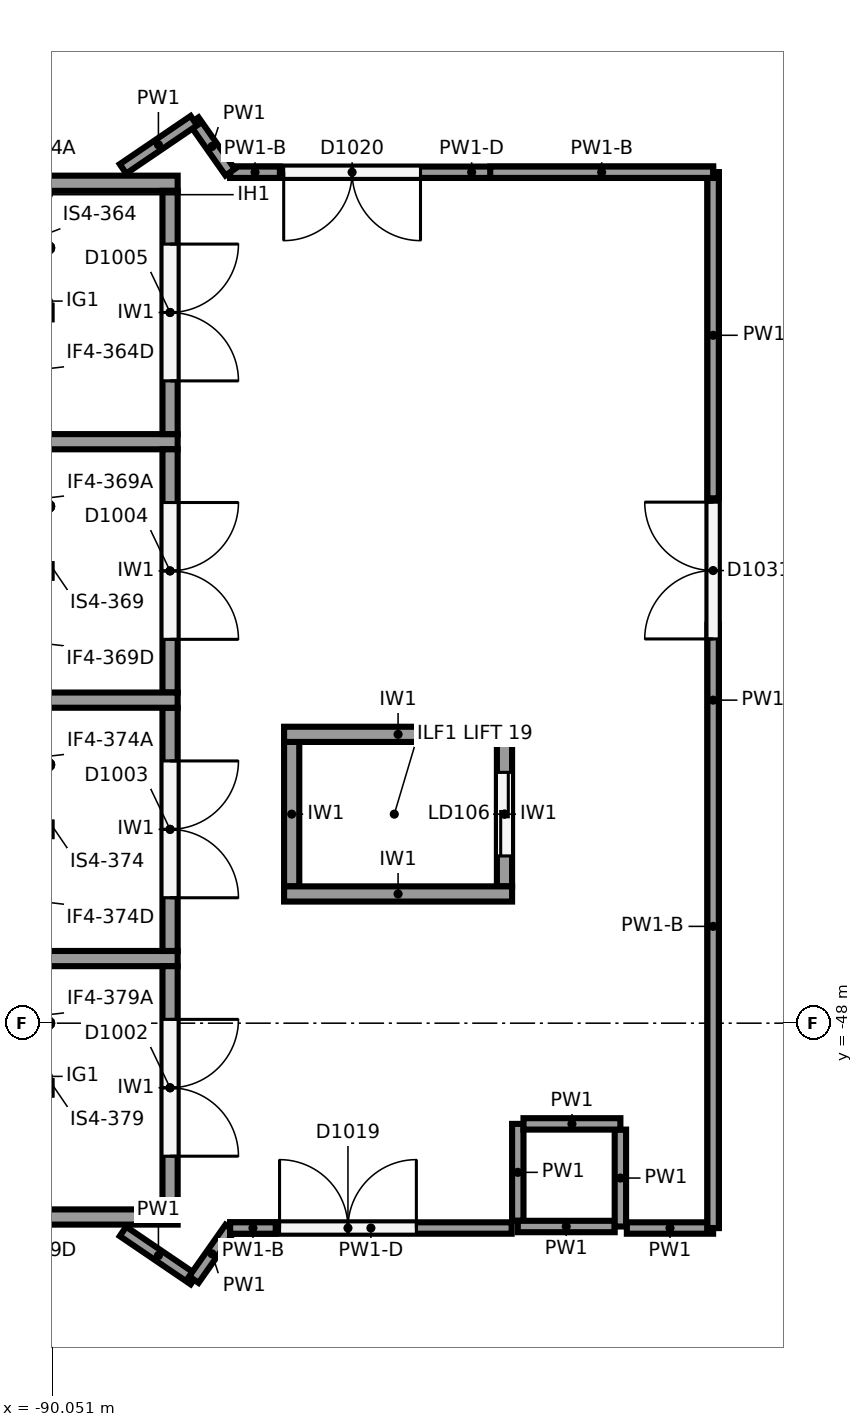
"""IFC4 building model, lengths in metres.
Left out: names, types, materials, properties, quantities, classifications, styles, units other than length and angle.
Written with IfcOpenShell. Run it as: python <this file> out.ifc"""

import sys

from ifc_helpers import new_model, si_unit, direction, frame, frame_2d, origin, origin_2d, place, context, subcontext, project, spatial, rectangle, circle, extrude, element, fill, save


model = new_model("IFC4")
c1 = context("Model", 3, precision=1e-05, world=origin(), true_north=direction((0.0, 1.0)))
c2 = subcontext(c1, "Body", "Model", "MODEL_VIEW")
j1 = project(units=[si_unit("LENGTHUNIT", "METRE"), si_unit("PLANEANGLEUNIT", "RADIAN")], contexts=[c1])
p1 = place(None, origin())
s1 = spatial("IfcSite", under=j1, at=p1, CompositionType="ELEMENT")
p2 = place(p1, origin())
s2 = spatial("IfcBuilding", under=s1, at=p2, CompositionType="ELEMENT")
p3 = place(p2, frame((0.0, 0.0, 12.0)))
s3 = spatial("IfcBuildingStorey", under=s2, at=p3, CompositionType="ELEMENT", Elevation=12.0)
p4 = place(p3, frame((-84.884, -42.562, 0.0), z_axis=(0.0, 0.0, 1.0), x_axis=(1.0, 0.0, 0.0)))
e1 = element("IfcColumn", 1, at=p4, inside=s3, PredefinedType="COLUMN", context=c2, shape_type="SweptSolid", body=[
    extrude(circle(Radius=0.6, at=origin_2d()), origin(), (0.0, 0.0, 1.0), 6.0),
])
for number, where, z_axis, x_axis in (
    (2, (-97.2, -36.95, 0.0), (0.0, 0.0, 1.0), (1.0, 0.0, 0.0)),
    (3, (-97.2, -43.75, 0.0), (0.0, 0.0, 1.0), (1.0, 0.0, 0.0)),
    (4, (-97.2, -50.55, 0.0), (0.0, 0.0, 1.0), (1.0, 0.0, 0.0)),
    (5, (-97.2, -40.35, 0.0), (0.0, 0.0, 1.0), (1.0, 0.0, 0.0)),
    (6, (-97.2, -47.15, 0.0), (0.0, 0.0, 1.0), (1.0, 0.0, 0.0)),
):
    element("IfcWall", number, at=place(p3, frame(where, z_axis=z_axis, x_axis=x_axis)), inside=s3, PredefinedType="SHEAR", context=c2, shape_type="SweptSolid", body=[
        extrude(rectangle(XDim=8.8, YDim=0.2, at=frame_2d((4.4, 0.0))), origin(), (0.0, 0.0, 1.0), 5.65),
    ])
p5 = place(p3, frame((-88.5, -37.05, 0.0), z_axis=(0.0, 0.0, 1.0), x_axis=(0.0, -1.0, 0.0)))
e7 = element("IfcWall", 7, at=p5, inside=s3, PredefinedType="SHEAR", context=c2, shape_type="SweptSolid", body=[
    extrude(rectangle(XDim=3.2, YDim=0.2, at=frame_2d((1.6, 0.0))), origin(), (0.0, 0.0, 1.0), 5.65),
])
p6 = place(p5, frame((0.7, 0.0, 0.0)))
e8 = element("IfcOpeningElement", 8, at=p6, cuts=e7, PredefinedType="OPENING", context=c2, shape_type="SweptSolid", body=[
    extrude(rectangle(XDim=1.8, YDim=2.1, at=frame_2d((0.9, 1.05))), frame((0.0, 0.11, 0.0), z_axis=(0.0, -1.0, 0.0), x_axis=(1.0, 0.0, 0.0)), (0.0, 0.0, 1.0), 0.22),
])
p7 = place(p3, frame((-88.5, -40.45, 0.0), z_axis=(0.0, 0.0, 1.0), x_axis=(0.0, -1.0, 0.0)))
e9 = element("IfcWall", 9, at=p7, inside=s3, PredefinedType="SHEAR", context=c2, shape_type="SweptSolid", body=[
    extrude(rectangle(XDim=3.2, YDim=0.2, at=frame_2d((1.6, 0.0))), origin(), (0.0, 0.0, 1.0), 5.65),
])
p8 = place(p7, frame((0.7, 0.0, 0.0)))
e10 = element("IfcOpeningElement", 10, at=p8, cuts=e9, PredefinedType="OPENING", context=c2, shape_type="SweptSolid", body=[
    extrude(rectangle(XDim=1.8, YDim=2.1, at=frame_2d((0.9, 1.05))), frame((0.0, 0.11, 0.0), z_axis=(0.0, -1.0, 0.0), x_axis=(1.0, 0.0, 0.0)), (0.0, 0.0, 1.0), 0.22),
])
p9 = place(p3, frame((-88.5, -43.85, 0.0), z_axis=(0.0, 0.0, 1.0), x_axis=(0.0, -1.0, 0.0)))
e11 = element("IfcWall", 11, at=p9, inside=s3, PredefinedType="SHEAR", context=c2, shape_type="SweptSolid", body=[
    extrude(rectangle(XDim=3.2, YDim=0.2, at=frame_2d((1.6, 0.0))), origin(), (0.0, 0.0, 1.0), 5.65),
])
p10 = place(p9, frame((0.7, 0.0, 0.0)))
e12 = element("IfcOpeningElement", 12, at=p10, cuts=e11, PredefinedType="OPENING", context=c2, shape_type="SweptSolid", body=[
    extrude(rectangle(XDim=1.8, YDim=2.1, at=frame_2d((0.9, 1.05))), frame((0.0, 0.11, 0.0), z_axis=(0.0, -1.0, 0.0), x_axis=(1.0, 0.0, 0.0)), (0.0, 0.0, 1.0), 0.22),
])
p11 = place(p3, frame((-88.5, -47.25, 0.0), z_axis=(0.0, 0.0, 1.0), x_axis=(0.0, -1.0, 0.0)))
e13 = element("IfcWall", 13, at=p11, inside=s3, PredefinedType="SHEAR", context=c2, shape_type="SweptSolid", body=[
    extrude(rectangle(XDim=3.2, YDim=0.2, at=frame_2d((1.6, 0.0))), origin(), (0.0, 0.0, 1.0), 5.65),
])
p12 = place(p11, frame((0.7, 0.0, 0.0)))
e14 = element("IfcOpeningElement", 14, at=p12, cuts=e13, PredefinedType="OPENING", context=c2, shape_type="SweptSolid", body=[
    extrude(rectangle(XDim=1.8, YDim=2.1, at=frame_2d((0.9, 1.05))), frame((0.0, 0.11, 0.0), z_axis=(0.0, -1.0, 0.0), x_axis=(1.0, 0.0, 0.0)), (0.0, 0.0, 1.0), 0.22),
])
for number, where, z_axis, x_axis in (
    (15, (-87.0, -44.2, 0.0), (0.0, 0.0, 1.0), (1.0, 0.0, 0.0)),
    (16, (-87.0, -46.3, 0.0), (0.0, 0.0, 1.0), (1.0, 0.0, 0.0)),
):
    element("IfcWall", number, at=place(p3, frame(where, z_axis=z_axis, x_axis=x_axis)), inside=s3, PredefinedType="SHEAR", context=c2, shape_type="SweptSolid", body=[
        extrude(rectangle(XDim=3.0, YDim=0.2, at=frame_2d((1.5, 0.0))), origin(), (0.0, 0.0, 1.0), 5.65),
    ])
p13 = place(p3, frame((-86.9, -44.3, 0.0), z_axis=(0.0, 0.0, 1.0), x_axis=(0.0, -1.0, 0.0)))
e17 = element("IfcWall", 17, at=p13, inside=s3, PredefinedType="SHEAR", context=c2, shape_type="SweptSolid", body=[
    extrude(rectangle(XDim=1.9, YDim=0.2, at=frame_2d((0.95, 0.0))), origin(), (0.0, 0.0, 1.0), 5.65),
])
p14 = place(p3, frame((-84.1, -44.3, 0.0), z_axis=(0.0, 0.0, 1.0), x_axis=(0.0, -1.0, 0.0)))
e18 = element("IfcWall", 18, at=p14, inside=s3, PredefinedType="SHEAR", context=c2, shape_type="SweptSolid", body=[
    extrude(rectangle(XDim=1.9, YDim=0.2, at=frame_2d((0.95, 0.0))), origin(), (0.0, 0.0, 1.0), 5.65),
])
p15 = place(p14, frame((0.4, 0.0, 0.0)))
e19 = element("IfcOpeningElement", 19, at=p15, cuts=e18, PredefinedType="OPENING", context=c2, shape_type="SweptSolid", body=[
    extrude(rectangle(XDim=1.1, YDim=2.1, at=frame_2d((0.55, 1.05))), frame((0.0, 0.11, 0.0), z_axis=(0.0, -1.0, 0.0), x_axis=(1.0, 0.0, 0.0)), (0.0, 0.0, 1.0), 0.22),
])
for number, where, z_axis, x_axis in (
    (20, (-83.925, -49.325, 0.0), (0.0, 0.0, 1.0), (0.0, -1.0, 0.0)),
    (21, (-83.925, -50.675, 0.0), (0.0, 0.0, 1.0), (1.0, 0.0, 0.0)),
    (22, (-82.575, -50.675, 0.0), (0.0, 0.0, 1.0), (0.0, 1.0, 0.0)),
    (23, (-82.575, -49.325, 0.0), (0.0, 0.0, 1.0), (-1.0, 0.0, 0.0)),
):
    element("IfcWall", number, at=place(p3, frame(where, z_axis=z_axis, x_axis=x_axis)), inside=s3, PredefinedType="PARTITIONING", context=c2, shape_type="SweptSolid", body=[
        extrude(rectangle(XDim=1.275, YDim=0.15, at=frame_2d((0.638, 0.0))), origin(), (0.0, 0.0, 1.0), 5.65),
    ])
p16 = place(p3, frame((-89.12, -50.74, 0.0), z_axis=(0.0, 0.0, 1.0), x_axis=(0.827055308354, -0.562120553728, 0.0)))
e24 = element("IfcWall", 24, at=p16, inside=s3, PredefinedType="PARTITIONING", context=c2, shape_type="SweptSolid", body=[
    extrude(rectangle(XDim=1.128, YDim=0.15, at=frame_2d((0.564, 0.0))), origin(), (0.0, 0.0, 1.0), 5.65),
])
p17 = place(p3, frame((-88.187, -51.374, 0.0), z_axis=(0.0, 0.0, 1.0), x_axis=(0.575376756214, 0.817888493872, 0.0)))
e25 = element("IfcWall", 25, at=p17, inside=s3, PredefinedType="PARTITIONING", context=c2, shape_type="SweptSolid", body=[
    extrude(rectangle(XDim=0.83, YDim=0.15, at=frame_2d((0.415, 0.0))), origin(), (0.0, 0.0, 1.0), 5.65),
])
p18 = place(p3, frame((-87.709, -50.695, 0.0), z_axis=(0.0, 0.0, 1.0), x_axis=(1.0, 0.0, 0.0)))
e26 = element("IfcWall", 26, at=p18, inside=s3, PredefinedType="PARTITIONING", context=c2, shape_type="SweptSolid", body=[
    extrude(rectangle(XDim=3.704, YDim=0.15, at=frame_2d((1.852, 0.0))), origin(), (0.0, 0.0, 1.0), 4.55),
])
p19 = place(p18, frame((0.65, 0.0, 0.0)))
e27 = element("IfcOpeningElement", 27, at=p19, cuts=e26, PredefinedType="OPENING", context=c2, shape_type="SweptSolid", body=[
    extrude(rectangle(XDim=1.8, YDim=2.1, at=frame_2d((0.9, 1.05))), frame((0.0, 0.085, 0.0), z_axis=(0.0, -1.0, 0.0), x_axis=(1.0, 0.0, 0.0)), (0.0, 0.0, 1.0), 0.17),
])
p20 = place(p3, frame((-87.709, -50.695, 4.55), z_axis=(0.0, 0.0, 1.0), x_axis=(1.0, 0.0, 0.0)))
e28 = element("IfcWall", 28, at=p20, inside=s3, PredefinedType="PARTITIONING", context=c2, shape_type="SweptSolid", body=[
    extrude(rectangle(XDim=0.6, YDim=0.15, at=frame_2d((0.3, 0.0))), origin(), (0.0, 0.0, 1.0), 1.1),
])
p21 = place(p3, frame((-82.49, -50.695, 0.0), z_axis=(0.0, 0.0, 1.0), x_axis=(1.0, 0.0, 0.0)))
e29 = element("IfcWall", 29, at=p21, inside=s3, PredefinedType="PARTITIONING", context=c2, shape_type="SweptSolid", body=[
    extrude(rectangle(XDim=1.135, YDim=0.15, at=frame_2d((0.567, 0.0))), origin(), (0.0, 0.0, 1.0), 5.65),
])
p22 = place(p3, frame((-81.355, -50.695, 0.0), z_axis=(0.0, 0.0, 1.0), x_axis=(0.0, 1.0, 0.0)))
e30 = element("IfcWall", 30, at=p22, inside=s3, PredefinedType="PARTITIONING", context=c2, shape_type="SweptSolid", body=[
    extrude(rectangle(XDim=13.89, YDim=0.15, at=frame_2d((6.945, 0.0))), origin(), (0.0, 0.0, 1.0), 4.55),
])
p23 = place(p22, frame((7.75, 0.0, 0.0)))
e31 = element("IfcOpeningElement", 31, at=p23, cuts=e30, PredefinedType="OPENING", context=c2, shape_type="SweptSolid", body=[
    extrude(rectangle(XDim=1.8, YDim=2.1, at=frame_2d((0.9, 1.05))), frame((0.0, 0.085, 0.0), z_axis=(0.0, -1.0, 0.0), x_axis=(1.0, 0.0, 0.0)), (0.0, 0.0, 1.0), 0.17),
])
p24 = place(p3, frame((-81.355, -50.695, 4.55), z_axis=(0.0, 0.0, 1.0), x_axis=(0.0, 1.0, 0.0)))
e32 = element("IfcWall", 32, at=p24, inside=s3, PredefinedType="PARTITIONING", context=c2, shape_type="SweptSolid", body=[
    extrude(rectangle(XDim=7.937, YDim=0.15, at=frame_2d((3.969, 0.0))), origin(), (0.0, 0.0, 1.0), 1.1),
])
p25 = place(p3, frame((-81.355, -41.095, 4.55), z_axis=(0.0, 0.0, 1.0), x_axis=(0.0, 1.0, 0.0)))
e33 = element("IfcWall", 33, at=p25, inside=s3, PredefinedType="PARTITIONING", context=c2, shape_type="SweptSolid", body=[
    extrude(rectangle(XDim=4.29, YDim=0.15, at=frame_2d((2.145, 0.0))), origin(), (0.0, 0.0, 1.0), 1.1),
])
p26 = place(p3, frame((-81.355, -36.805, 0.0), z_axis=(0.0, 0.0, 1.0), x_axis=(-1.0, 0.0, 0.0)))
e34 = element("IfcWall", 34, at=p26, inside=s3, PredefinedType="PARTITIONING", context=c2, shape_type="SweptSolid", body=[
    extrude(rectangle(XDim=6.354, YDim=0.15, at=frame_2d((3.177, 0.0))), origin(), (0.0, 0.0, 1.0), 4.55),
])
p27 = place(p26, frame((3.85, 0.0, 0.0)))
e35 = element("IfcOpeningElement", 35, at=p27, cuts=e34, PredefinedType="OPENING", context=c2, shape_type="SweptSolid", body=[
    extrude(rectangle(XDim=1.8, YDim=2.1, at=frame_2d((0.9, 1.05))), frame((0.0, 0.085, 0.0), z_axis=(0.0, -1.0, 0.0), x_axis=(1.0, 0.0, 0.0)), (0.0, 0.0, 1.0), 0.17),
])
p28 = place(p3, frame((-81.355, -36.805, 4.55), z_axis=(0.0, 0.0, 1.0), x_axis=(-1.0, 0.0, 0.0)))
e36 = element("IfcWall", 36, at=p28, inside=s3, PredefinedType="PARTITIONING", context=c2, shape_type="SweptSolid", body=[
    extrude(rectangle(XDim=2.933, YDim=0.15, at=frame_2d((1.466, 0.0))), origin(), (0.0, 0.0, 1.0), 1.1),
])
p29 = place(p3, frame((-87.055, -36.805, 4.55), z_axis=(0.0, 0.0, 1.0), x_axis=(-1.0, 0.0, 0.0)))
e37 = element("IfcWall", 37, at=p29, inside=s3, PredefinedType="PARTITIONING", context=c2, shape_type="SweptSolid", body=[
    extrude(rectangle(XDim=0.654, YDim=0.15, at=frame_2d((0.327, 0.0))), origin(), (0.0, 0.0, 1.0), 1.1),
])
p30 = place(p3, frame((-87.709, -36.805, 0.0), z_axis=(0.0, 0.0, 1.0), x_axis=(-0.575573582652, 0.81774999294, 0.0)))
e38 = element("IfcWall", 38, at=p30, inside=s3, PredefinedType="PARTITIONING", context=c2, shape_type="SweptSolid", body=[
    extrude(rectangle(XDim=0.83, YDim=0.15, at=frame_2d((0.415, 0.0))), origin(), (0.0, 0.0, 1.0), 5.65),
])
p31 = place(p3, frame((-88.187, -36.126, 0.0), z_axis=(0.0, 0.0, 1.0), x_axis=(-0.827055308354, -0.562120553728, 0.0)))
e39 = element("IfcWall", 39, at=p31, inside=s3, PredefinedType="PARTITIONING", context=c2, shape_type="SweptSolid", body=[
    extrude(rectangle(XDim=1.128, YDim=0.15, at=frame_2d((0.564, 0.0))), origin(), (0.0, 0.0, 1.0), 5.65),
])
p32 = place(p6, origin())
e40 = element("IfcDoor", 40, at=p32, inside=s3, OperationType="DOUBLE_DOOR_SINGLE_SWING", PredefinedType="DOOR", context=c2, shape_type="SweptSolid", body=[
    extrude(rectangle(XDim=1.8, YDim=2.1, at=frame_2d((0.9, 1.05))), frame((0.0, 0.025, 0.0), z_axis=(0.0, -1.0, 0.0), x_axis=(1.0, 0.0, 0.0)), (0.0, 0.0, 1.0), 0.05),
])
fill(e8, e40)
p33 = place(p8, origin())
e41 = element("IfcDoor", 41, at=p33, inside=s3, OperationType="DOUBLE_DOOR_SINGLE_SWING", PredefinedType="DOOR", context=c2, shape_type="SweptSolid", body=[
    extrude(rectangle(XDim=1.8, YDim=2.1, at=frame_2d((0.9, 1.05))), frame((0.0, 0.025, 0.0), z_axis=(0.0, -1.0, 0.0), x_axis=(1.0, 0.0, 0.0)), (0.0, 0.0, 1.0), 0.05),
])
fill(e10, e41)
p34 = place(p10, origin())
e42 = element("IfcDoor", 42, at=p34, inside=s3, OperationType="DOUBLE_DOOR_SINGLE_SWING", PredefinedType="DOOR", context=c2, shape_type="SweptSolid", body=[
    extrude(rectangle(XDim=1.8, YDim=2.1, at=frame_2d((0.9, 1.05))), frame((0.0, 0.025, 0.0), z_axis=(0.0, -1.0, 0.0), x_axis=(1.0, 0.0, 0.0)), (0.0, 0.0, 1.0), 0.05),
])
fill(e12, e42)
p35 = place(p12, origin())
e43 = element("IfcDoor", 43, at=p35, inside=s3, OperationType="DOUBLE_DOOR_SINGLE_SWING", PredefinedType="DOOR", context=c2, shape_type="SweptSolid", body=[
    extrude(rectangle(XDim=1.8, YDim=2.1, at=frame_2d((0.9, 1.05))), frame((0.0, 0.025, 0.0), z_axis=(0.0, -1.0, 0.0), x_axis=(1.0, 0.0, 0.0)), (0.0, 0.0, 1.0), 0.05),
])
fill(e14, e43)
p36 = place(p15, origin())
e44 = element("IfcDoor", 44, at=p36, inside=s3, OperationType="SLIDING_TO_RIGHT", PredefinedType="DOOR", context=c2, shape_type="SweptSolid", body=[
    extrude(rectangle(XDim=1.1, YDim=2.1, at=frame_2d((0.55, 1.05))), frame((0.0, 0.025, 0.0), z_axis=(0.0, -1.0, 0.0), x_axis=(1.0, 0.0, 0.0)), (0.0, 0.0, 1.0), 0.05),
])
fill(e19, e44)
p37 = place(p23, origin())
e45 = element("IfcDoor", 45, at=p37, inside=s3, OperationType="DOUBLE_DOOR_SINGLE_SWING", PredefinedType="DOOR", context=c2, shape_type="SweptSolid", body=[
    extrude(rectangle(XDim=1.8, YDim=2.1, at=frame_2d((0.9, 1.05))), frame((0.0, 0.025, 0.0), z_axis=(0.0, -1.0, 0.0), x_axis=(1.0, 0.0, 0.0)), (0.0, 0.0, 1.0), 0.05),
])
fill(e31, e45)
p38 = place(p19, origin())
e46 = element("IfcDoor", 46, at=p38, inside=s3, OperationType="DOUBLE_DOOR_SINGLE_SWING", PredefinedType="DOOR", context=c2, shape_type="SweptSolid", body=[
    extrude(rectangle(XDim=1.8, YDim=2.1, at=frame_2d((0.9, 1.05))), frame((0.0, 0.025, 0.0), z_axis=(0.0, -1.0, 0.0), x_axis=(1.0, 0.0, 0.0)), (0.0, 0.0, 1.0), 0.05),
])
fill(e27, e46)
p39 = place(p27, origin())
e47 = element("IfcDoor", 47, at=p39, inside=s3, OperationType="DOUBLE_DOOR_SINGLE_SWING", PredefinedType="DOOR", context=c2, shape_type="SweptSolid", body=[
    extrude(rectangle(XDim=1.8, YDim=2.1, at=frame_2d((0.9, 1.05))), frame((0.0, 0.025, 0.0), z_axis=(0.0, -1.0, 0.0), x_axis=(1.0, 0.0, 0.0)), (0.0, 0.0, 1.0), 0.05),
])
fill(e35, e47)
save(model, sys.argv[1])
